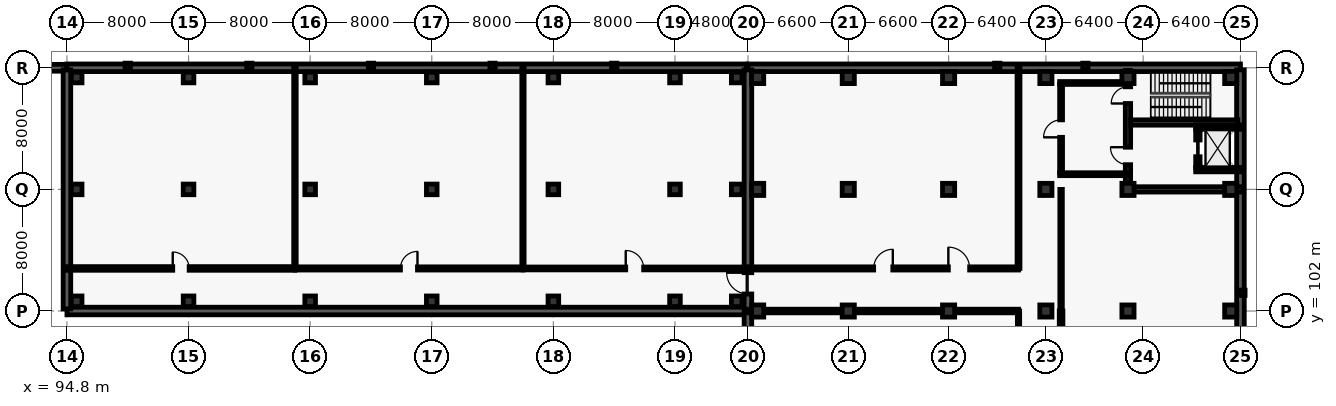
"""IFC4 building model, lengths in metres.
Left out: names, types, materials, properties, quantities, classifications, styles, units other than length and angle.
Written with IfcOpenShell. Run it as: python <this file> out.ifc"""

import sys

from ifc_helpers import new_model, si_unit, direction, frame, frame_2d, origin, origin_2d, place, context, subcontext, project, spatial, rectangle, extrude, element, fill, save


model = new_model("IFC4")
c1 = context("Model", 3, precision=1e-05, world=origin(), true_north=direction((0.0, 1.0)))
c2 = subcontext(c1, "Body", "Model", "MODEL_VIEW")
j1 = project(units=[si_unit("LENGTHUNIT", "METRE"), si_unit("PLANEANGLEUNIT", "RADIAN")], contexts=[c1])
p1 = place(None, origin())
s1 = spatial("IfcSite", under=j1, at=p1, CompositionType="ELEMENT")
p2 = place(p1, origin())
s2 = spatial("IfcBuilding", under=s1, at=p2, CompositionType="ELEMENT")
p3 = place(p2, frame((0.0, 0.0, -4.8)))
s3 = spatial("IfcBuildingStorey", under=s2, at=p3, CompositionType="ELEMENT", Elevation=-4.8)
for number, where, z_axis, x_axis in (
    (1, (95.44, 102.64, 0.0), (0.0, 0.0, 1.0), (1.0, 0.0, 0.0)),
    (2, (95.44, 110.0, 0.0), (0.0, 0.0, 1.0), (1.0, 0.0, 0.0)),
    (3, (95.44, 117.36, 0.0), (0.0, 0.0, 1.0), (1.0, 0.0, 0.0)),
    (4, (102.8, 102.64, 0.0), (0.0, 0.0, 1.0), (1.0, 0.0, 0.0)),
    (5, (102.8, 110.0, 0.0), (0.0, 0.0, 1.0), (1.0, 0.0, 0.0)),
    (6, (102.8, 117.36, 0.0), (0.0, 0.0, 1.0), (1.0, 0.0, 0.0)),
    (7, (110.8, 102.64, 0.0), (0.0, 0.0, 1.0), (1.0, 0.0, 0.0)),
    (8, (110.8, 110.0, 0.0), (0.0, 0.0, 1.0), (1.0, 0.0, 0.0)),
    (9, (110.8, 117.36, 0.0), (0.0, 0.0, 1.0), (1.0, 0.0, 0.0)),
    (10, (118.8, 102.64, 0.0), (0.0, 0.0, 1.0), (1.0, 0.0, 0.0)),
    (11, (118.8, 110.0, 0.0), (0.0, 0.0, 1.0), (1.0, 0.0, 0.0)),
    (12, (118.8, 117.36, 0.0), (0.0, 0.0, 1.0), (1.0, 0.0, 0.0)),
    (13, (126.8, 102.64, 0.0), (0.0, 0.0, 1.0), (1.0, 0.0, 0.0)),
    (14, (126.8, 110.0, 0.0), (0.0, 0.0, 1.0), (1.0, 0.0, 0.0)),
    (15, (126.8, 117.36, 0.0), (0.0, 0.0, 1.0), (1.0, 0.0, 0.0)),
    (16, (134.8, 102.64, 0.0), (0.0, 0.0, 1.0), (1.0, 0.0, 0.0)),
    (17, (134.8, 110.0, 0.0), (0.0, 0.0, 1.0), (1.0, 0.0, 0.0)),
    (18, (134.8, 117.36, 0.0), (0.0, 0.0, 1.0), (1.0, 0.0, 0.0)),
    (19, (138.86, 102.64, 0.0), (0.0, 0.0, 1.0), (1.0, 0.0, 0.0)),
    (20, (138.86, 110.0, 0.0), (0.0, 0.0, 1.0), (1.0, 0.0, 0.0)),
    (21, (138.86, 117.36, 0.0), (0.0, 0.0, 1.0), (1.0, 0.0, 0.0)),
):
    element("IfcColumn", number, at=place(p3, frame(where, z_axis=z_axis, x_axis=x_axis)), inside=s3, PredefinedType="COLUMN", context=c2, shape_type="SweptSolid", body=[
        extrude(rectangle(XDim=0.7, YDim=0.7, at=origin_2d()), origin(), (0.0, 0.0, 1.0), 4.8),
    ])
for number, where, z_axis, x_axis in (
    (22, (140.24, 102.0, 0.0), (0.0, 0.0, 1.0), (1.0, 0.0, 0.0)),
    (23, (140.24, 110.0, 0.0), (0.0, 0.0, 1.0), (1.0, 0.0, 0.0)),
    (24, (140.24, 117.36, 0.0), (0.0, 0.0, 1.0), (1.0, 0.0, 0.0)),
    (25, (146.2, 102.0, 0.0), (0.0, 0.0, 1.0), (1.0, 0.0, 0.0)),
    (26, (146.2, 110.0, 0.0), (0.0, 0.0, 1.0), (1.0, 0.0, 0.0)),
    (27, (146.2, 117.36, 0.0), (0.0, 0.0, 1.0), (1.0, 0.0, 0.0)),
    (28, (152.8, 102.0, 0.0), (0.0, 0.0, 1.0), (1.0, 0.0, 0.0)),
    (29, (152.8, 110.0, 0.0), (0.0, 0.0, 1.0), (1.0, 0.0, 0.0)),
    (30, (152.8, 117.36, 0.0), (0.0, 0.0, 1.0), (1.0, 0.0, 0.0)),
    (31, (159.2, 102.0, 0.0), (0.0, 0.0, 1.0), (1.0, 0.0, 0.0)),
    (32, (159.2, 110.0, 0.0), (0.0, 0.0, 1.0), (1.0, 0.0, 0.0)),
    (33, (159.2, 117.36, 0.0), (0.0, 0.0, 1.0), (1.0, 0.0, 0.0)),
    (34, (164.6, 102.0, 0.0), (0.0, 0.0, 1.0), (1.0, 0.0, 0.0)),
    (35, (164.6, 110.0, 0.0), (0.0, 0.0, 1.0), (1.0, 0.0, 0.0)),
    (36, (164.6, 117.36, 0.0), (0.0, 0.0, 1.0), (1.0, 0.0, 0.0)),
    (37, (171.36, 102.0, 0.0), (0.0, 0.0, 1.0), (1.0, 0.0, 0.0)),
    (38, (171.36, 110.0, 0.0), (0.0, 0.0, 1.0), (1.0, 0.0, 0.0)),
    (39, (171.36, 117.36, 0.0), (0.0, 0.0, 1.0), (1.0, 0.0, 0.0)),
):
    element("IfcColumn", number, at=place(p3, frame(where, z_axis=z_axis, x_axis=x_axis)), inside=s3, PredefinedType="COLUMN", context=c2, shape_type="SweptSolid", body=[
        extrude(rectangle(XDim=0.8, YDim=0.8, at=origin_2d()), origin(), (0.0, 0.0, 1.0), 4.8),
    ])
for number, where, z_axis, x_axis in (
    (40, (98.8, 118.08, -0.5), (0.0, 0.0, 1.0), (0.0, 1.0, 0.0)),
    (41, (106.8, 118.08, -0.5), (0.0, 0.0, 1.0), (0.0, 1.0, 0.0)),
    (42, (114.8, 118.08, -0.5), (0.0, 0.0, 1.0), (0.0, 1.0, 0.0)),
    (43, (122.8, 118.08, -0.5), (0.0, 0.0, 1.0), (0.0, 1.0, 0.0)),
    (44, (130.8, 118.08, -0.5), (0.0, 0.0, 1.0), (0.0, 1.0, 0.0)),
):
    element("IfcColumn", number, at=place(p3, frame(where, z_axis=z_axis, x_axis=x_axis)), inside=s3, PredefinedType="PILASTER", context=c2, shape_type="SweptSolid", body=[
        extrude(rectangle(XDim=0.35, YDim=0.45, at=origin_2d()), origin(), (0.0, 0.0, 1.0), 5.3),
    ])
for number, where, z_axis, x_axis in (
    (45, (172.08, 103.2, -0.48), (0.0, 0.0, 1.0), (1.0, 0.0, 0.0)),
    (46, (156.0, 118.08, -0.48), (0.0, 0.0, 1.0), (0.0, 1.0, 0.0)),
    (47, (161.8, 118.08, -0.48), (0.0, 0.0, 1.0), (0.0, 1.0, 0.0)),
):
    element("IfcColumn", number, at=place(p3, frame(where, z_axis=z_axis, x_axis=x_axis)), inside=s3, PredefinedType="PILASTER", context=c2, shape_type="SweptSolid", body=[
        extrude(rectangle(XDim=0.35, YDim=0.45, at=origin_2d()), origin(), (0.0, 0.0, 1.0), 5.28),
    ])
p4 = place(p3, frame((46.02, 118.0, 0.0), z_axis=(0.0, 0.0, 1.0), x_axis=(1.0, 0.0, 0.0)))
e48 = element("IfcWall", 48, at=p4, inside=s3, PredefinedType="USERDEFINED", context=c2, shape_type="SweptSolid", body=[
    extrude(rectangle(XDim=48.76, YDim=0.45, at=frame_2d((24.38, 0.0))), origin(), (0.0, 0.0, 1.0), 4.53),
])
for number, where, z_axis, x_axis in (
    (49, (94.8, 118.0, 0.0), (0.0, 0.0, 1.0), (1.0, 0.0, 0.0)),
    (50, (139.5, 102.0, 0.0), (0.0, 0.0, 1.0), (-1.0, 0.0, 0.0)),
):
    element("IfcWall", number, at=place(p3, frame(where, z_axis=z_axis, x_axis=x_axis)), inside=s3, PredefinedType="USERDEFINED", context=c2, shape_type="SweptSolid", body=[
        extrude(rectangle(XDim=44.7, YDim=0.5, at=frame_2d((22.35, 0.0))), origin(), (0.0, 0.0, 1.0), 4.45),
    ])
p5 = place(p3, frame((94.8, 102.14, 0.0), z_axis=(0.0, 0.0, 1.0), x_axis=(0.0, 1.0, 0.0)))
e51 = element("IfcWall", 51, at=p5, inside=s3, PredefinedType="USERDEFINED", context=c2, shape_type="SweptSolid", body=[
    extrude(rectangle(XDim=15.72, YDim=0.5, at=frame_2d((7.86, 0.0))), origin(), (0.0, 0.0, 1.0), 4.45),
])
p6 = place(p3, frame((139.6, 118.0, 0.0), z_axis=(0.0, 0.0, 1.0), x_axis=(1.0, 0.0, 0.0)))
e52 = element("IfcWall", 52, at=p6, inside=s3, PredefinedType="USERDEFINED", context=c2, shape_type="SweptSolid", body=[
    extrude(rectangle(XDim=32.4, YDim=0.5, at=frame_2d((16.2, 0.0))), origin(), (0.0, 0.0, 1.0), 4.5),
])
p7 = place(p3, frame((172.0, 117.86, 0.0), z_axis=(0.0, 0.0, 1.0), x_axis=(0.0, -1.0, 0.0)))
e53 = element("IfcWall", 53, at=p7, inside=s3, PredefinedType="USERDEFINED", context=c2, shape_type="SweptSolid", body=[
    extrude(rectangle(XDim=46.12, YDim=0.5, at=frame_2d((23.06, 0.0))), origin(), (0.0, 0.0, 1.0), 4.5),
])
p8 = place(p3, frame((139.6, 71.74, 0.0), z_axis=(0.0, 0.0, 1.0), x_axis=(0.0, 1.0, 0.0)))
e54 = element("IfcWall", 54, at=p8, inside=s3, PredefinedType="USERDEFINED", context=c2, shape_type="SweptSolid", body=[
    extrude(rectangle(XDim=46.12, YDim=0.5, at=frame_2d((23.06, 0.0))), origin(), (0.0, 0.0, 1.0), 3.67),
])
p9 = place(p8, frame((31.38, 0.0, 0.0)))
e55 = element("IfcOpeningElement", 55, at=p9, cuts=e54, PredefinedType="OPENING", context=c2, shape_type="SweptSolid", body=[
    extrude(rectangle(XDim=1.4, YDim=2.25, at=frame_2d((0.7, 1.125))), frame((0.0, 0.26, 0.0), z_axis=(0.0, -1.0, 0.0), x_axis=(1.0, 0.0, 0.0)), (0.0, 0.0, 1.0), 0.52),
])
p10 = place(p3, frame((165.002, 110.0, 0.0), z_axis=(0.0, 0.0, 1.0), x_axis=(1.0, 0.0, 0.0)))
e56 = element("IfcWall", 56, at=p10, inside=s3, PredefinedType="SHEAR", context=c2, shape_type="SweptSolid", body=[
    extrude(rectangle(XDim=7.173, YDim=0.35, at=frame_2d((3.586, 0.0))), origin(), (0.0, 0.0, 1.0), 4.5),
])
p11 = place(p3, frame((164.6, 110.402, 0.0), z_axis=(0.0, 0.0, 1.0), x_axis=(0.0, 1.0, 0.0)))
e57 = element("IfcWall", 57, at=p11, inside=s3, PredefinedType="SHEAR", context=c2, shape_type="SweptSolid", body=[
    extrude(rectangle(XDim=7.423, YDim=0.35, at=frame_2d((3.711, 0.0))), origin(), (0.0, 0.0, 1.0), 4.5),
])
p12 = place(p11, frame((5.248, 0.0, 0.0)))
e58 = element("IfcOpeningElement", 58, at=p12, cuts=e57, PredefinedType="OPENING", context=c2, shape_type="SweptSolid", body=[
    extrude(rectangle(XDim=1.1, YDim=2.15, at=frame_2d((0.55, 1.075))), frame((0.0, 0.185, 0.0), z_axis=(0.0, -1.0, 0.0), x_axis=(1.0, 0.0, 0.0)), (0.0, 0.0, 1.0), 0.37),
])
p13 = place(p11, frame((1.223, 0.0, 0.0)))
e59 = element("IfcOpeningElement", 59, at=p13, cuts=e57, PredefinedType="OPENING", context=c2, shape_type="SweptSolid", body=[
    extrude(rectangle(XDim=1.15, YDim=2.2, at=frame_2d((0.575, 1.1))), frame((0.0, 0.185, 0.0), z_axis=(0.0, -1.0, 0.0), x_axis=(1.0, 0.0, 0.0)), (0.0, 0.0, 1.0), 0.37),
])
p14 = place(p3, frame((164.775, 114.4, 0.0), z_axis=(0.0, 0.0, 1.0), x_axis=(1.0, 0.0, 0.0)))
e60 = element("IfcWall", 60, at=p14, inside=s3, PredefinedType="SHEAR", context=c2, shape_type="SweptSolid", body=[
    extrude(rectangle(XDim=7.05, YDim=0.35, at=frame_2d((3.525, 0.0))), origin(), (0.0, 0.0, 1.0), 4.5),
])
for number, where, z_axis, x_axis in (
    (61, (169.055, 111.3, 0.0), (0.0, 0.0, 1.0), (1.0, 0.0, 0.0)),
    (62, (169.055, 114.1, 0.0), (0.0, 0.0, 1.0), (1.0, 0.0, 0.0)),
):
    element("IfcWall", number, at=place(p3, frame(where, z_axis=z_axis, x_axis=x_axis)), inside=s3, PredefinedType="SHEAR", context=c2, shape_type="SweptSolid", body=[
        extrude(rectangle(XDim=2.89, YDim=0.29, at=frame_2d((1.445, 0.0))), origin(), (0.0, 0.0, 1.0), 4.5),
    ])
p15 = place(p3, frame((169.2, 111.445, 0.0), z_axis=(0.0, 0.0, 1.0), x_axis=(0.0, 1.0, 0.0)))
e63 = element("IfcWall", 63, at=p15, inside=s3, PredefinedType="SHEAR", context=c2, shape_type="SweptSolid", body=[
    extrude(rectangle(XDim=2.51, YDim=0.29, at=frame_2d((1.255, 0.0))), origin(), (0.0, 0.0, 1.0), 4.5),
])
p16 = place(p15, frame((0.705, 0.0, 0.0)))
e64 = element("IfcOpeningElement", 64, at=p16, cuts=e63, PredefinedType="OPENING", context=c2, shape_type="SweptSolid", body=[
    extrude(rectangle(XDim=1.1, YDim=2.15, at=frame_2d((0.55, 1.075))), frame((0.0, 0.155, 0.0), z_axis=(0.0, -1.0, 0.0), x_axis=(1.0, 0.0, 0.0)), (0.0, 0.0, 1.0), 0.31),
])
p17 = place(p3, frame((160.105, 111.0, 0.0), z_axis=(0.0, 0.0, 1.0), x_axis=(1.0, 0.0, 0.0)))
e65 = element("IfcWall", 65, at=p17, inside=s3, PredefinedType="PARTITIONING", context=c2, shape_type="SweptSolid", body=[
    extrude(rectangle(XDim=4.495, YDim=0.19, at=frame_2d((2.248, 0.0))), origin(), (0.0, 0.0, 1.0), 4.5),
])
p18 = place(p3, frame((160.105, 117.0, 0.0), z_axis=(0.0, 0.0, 1.0), x_axis=(1.0, 0.0, 0.0)))
e66 = element("IfcWall", 66, at=p18, inside=s3, PredefinedType="PARTITIONING", context=c2, shape_type="SweptSolid", body=[
    extrude(rectangle(XDim=4.093, YDim=0.19, at=frame_2d((2.046, 0.0))), origin(), (0.0, 0.0, 1.0), 3.85),
])
p19 = place(p3, frame((160.2, 111.095, 0.0), z_axis=(0.0, 0.0, 1.0), x_axis=(0.0, 1.0, 0.0)))
e67 = element("IfcWall", 67, at=p19, inside=s3, PredefinedType="PARTITIONING", context=c2, shape_type="SweptSolid", body=[
    extrude(rectangle(XDim=5.81, YDim=0.19, at=frame_2d((2.905, 0.0))), origin(), (0.0, 0.0, 1.0), 4.5),
])
p20 = place(p19, frame((2.33, 0.0, 0.0)))
e68 = element("IfcOpeningElement", 68, at=p20, cuts=e67, PredefinedType="OPENING", context=c2, shape_type="SweptSolid", body=[
    extrude(rectangle(XDim=1.15, YDim=2.2, at=frame_2d((0.575, 1.1))), frame((0.0, 0.105, 0.0), z_axis=(0.0, -1.0, 0.0), x_axis=(1.0, 0.0, 0.0)), (0.0, 0.0, 1.0), 0.21),
])
p21 = place(p3, frame((94.8, 104.8, 0.0), z_axis=(0.0, 0.0, 1.0), x_axis=(1.0, 0.0, 0.0)))
e69 = element("IfcWall", 69, at=p21, inside=s3, PredefinedType="PARTITIONING", context=c2, shape_type="SweptSolid", body=[
    extrude(rectangle(XDim=15.0, YDim=0.24, at=frame_2d((7.5, 0.0))), origin(), (0.0, 0.0, 1.0), 4.45),
])
p22 = place(p21, frame((6.96, 0.0, 0.0)))
e70 = element("IfcOpeningElement", 70, at=p22, cuts=e69, PredefinedType="OPENING", context=c2, shape_type="SweptSolid", body=[
    extrude(rectangle(XDim=1.08, YDim=2.15, at=frame_2d((0.54, 1.075))), frame((0.0, 0.13, 0.0), z_axis=(0.0, -1.0, 0.0), x_axis=(1.0, 0.0, 0.0)), (0.0, 0.0, 1.0), 0.26),
])
p23 = place(p3, frame((109.8, 104.8, 0.0), z_axis=(0.0, 0.0, 1.0), x_axis=(1.0, 0.0, 0.0)))
e71 = element("IfcWall", 71, at=p23, inside=s3, PredefinedType="PARTITIONING", context=c2, shape_type="SweptSolid", body=[
    extrude(rectangle(XDim=15.0, YDim=0.21, at=frame_2d((7.5, 0.0))), origin(), (0.0, 0.0, 1.0), 4.45),
])
p24 = place(p23, frame((6.94, 0.0, 0.0)))
e72 = element("IfcOpeningElement", 72, at=p24, cuts=e71, PredefinedType="OPENING", context=c2, shape_type="SweptSolid", body=[
    extrude(rectangle(XDim=1.12, YDim=2.15, at=frame_2d((0.56, 1.075))), frame((0.0, 0.115, 0.0), z_axis=(0.0, -1.0, 0.0), x_axis=(1.0, 0.0, 0.0)), (0.0, 0.0, 1.0), 0.23),
])
p25 = place(p3, frame((124.8, 104.8, 0.0), z_axis=(0.0, 0.0, 1.0), x_axis=(1.0, 0.0, 0.0)))
e73 = element("IfcWall", 73, at=p25, inside=s3, PredefinedType="PARTITIONING", context=c2, shape_type="SweptSolid", body=[
    extrude(rectangle(XDim=14.7, YDim=0.19, at=frame_2d((7.35, 0.0))), origin(), (0.0, 0.0, 1.0), 4.45),
])
p26 = place(p25, frame((6.76, 0.0, 0.0)))
e74 = element("IfcOpeningElement", 74, at=p26, cuts=e73, PredefinedType="OPENING", context=c2, shape_type="SweptSolid", body=[
    extrude(rectangle(XDim=1.18, YDim=2.15, at=frame_2d((0.59, 1.075))), frame((0.0, 0.105, 0.0), z_axis=(0.0, -1.0, 0.0), x_axis=(1.0, 0.0, 0.0)), (0.0, 0.0, 1.0), 0.21),
])
p27 = place(p3, frame((109.8, 118.0, 0.0), z_axis=(0.0, 0.0, 1.0), x_axis=(0.0, -1.0, 0.0)))
e75 = element("IfcWall", 75, at=p27, inside=s3, PredefinedType="PARTITIONING", context=c2, shape_type="SweptSolid", body=[
    extrude(rectangle(XDim=13.2, YDim=0.165, at=frame_2d((6.6, 0.0))), origin(), (0.0, 0.0, 1.0), 4.45),
])
p28 = place(p3, frame((124.8, 118.0, 0.0), z_axis=(0.0, 0.0, 1.0), x_axis=(0.0, -1.0, 0.0)))
e76 = element("IfcWall", 76, at=p28, inside=s3, PredefinedType="PARTITIONING", context=c2, shape_type="SweptSolid", body=[
    extrude(rectangle(XDim=13.2, YDim=0.15, at=frame_2d((6.6, 0.0))), origin(), (0.0, 0.0, 1.0), 4.45),
])
p29 = place(p3, frame((157.4, 102.0, 0.0), z_axis=(0.0, 0.0, 1.0), x_axis=(-1.0, 0.0, 0.0)))
e77 = element("IfcWall", 77, at=p29, inside=s3, PredefinedType="PARTITIONING", context=c2, shape_type="SweptSolid", body=[
    extrude(rectangle(XDim=17.8, YDim=0.24, at=frame_2d((8.9, 0.0))), origin(), (0.0, 0.0, 1.0), 3.85),
])
p30 = place(p3, frame((139.6, 104.8, 0.0), z_axis=(0.0, 0.0, 1.0), x_axis=(1.0, 0.0, 0.0)))
e78 = element("IfcWall", 78, at=p30, inside=s3, PredefinedType="PARTITIONING", context=c2, shape_type="SweptSolid", body=[
    extrude(rectangle(XDim=17.8, YDim=0.21, at=frame_2d((8.9, 0.0))), origin(), (0.0, 0.0, 1.0), 4.5),
])
p31 = place(p30, frame((8.27, 0.0, 0.0)))
e79 = element("IfcOpeningElement", 79, at=p31, cuts=e78, PredefinedType="OPENING", context=c2, shape_type="SweptSolid", body=[
    extrude(rectangle(XDim=1.26, YDim=2.2, at=frame_2d((0.63, 1.1))), frame((0.0, 0.115, 0.0), z_axis=(0.0, -1.0, 0.0), x_axis=(1.0, 0.0, 0.0)), (0.0, 0.0, 1.0), 0.23),
])
p32 = place(p30, frame((13.184, 0.0, 0.0)))
e80 = element("IfcOpeningElement", 80, at=p32, cuts=e78, PredefinedType="OPENING", context=c2, shape_type="SweptSolid", body=[
    extrude(rectangle(XDim=1.4, YDim=2.25, at=frame_2d((0.7, 1.125))), frame((0.0, 0.115, 0.0), z_axis=(0.0, -1.0, 0.0), x_axis=(1.0, 0.0, 0.0)), (0.0, 0.0, 1.0), 0.23),
])
p33 = place(p3, frame((157.4, 104.8, 0.0), z_axis=(0.0, 0.0, 1.0), x_axis=(0.0, 1.0, 0.0)))
e81 = element("IfcWall", 81, at=p33, inside=s3, PredefinedType="PARTITIONING", context=c2, shape_type="SweptSolid", body=[
    extrude(rectangle(XDim=13.2, YDim=0.19, at=frame_2d((6.6, 0.0))), origin(), (0.0, 0.0, 1.0), 4.5),
])
p34 = place(p3, frame((160.2, 110.0, 0.0), z_axis=(0.0, 0.0, 1.0), x_axis=(0.0, -1.0, 0.0)))
e82 = element("IfcWall", 82, at=p34, inside=s3, PredefinedType="PARTITIONING", context=c2, shape_type="SweptSolid", body=[
    extrude(rectangle(XDim=8.0, YDim=0.165, at=frame_2d((4.0, 0.0))), origin(), (0.0, 0.0, 1.0), 4.5),
])
p35 = place(p3, frame((157.4, 71.6, 0.0), z_axis=(0.0, 0.0, 1.0), x_axis=(0.0, 1.0, 0.0)))
e83 = element("IfcWall", 83, at=p35, inside=s3, PredefinedType="PARTITIONING", context=c2, shape_type="SweptSolid", body=[
    extrude(rectangle(XDim=30.4, YDim=0.15, at=frame_2d((15.2, 0.0))), origin(), (0.0, 0.0, 1.0), 4.5),
])
p36 = place(p35, frame((14.18, 0.0, 0.0)))
e84 = element("IfcOpeningElement", 84, at=p36, cuts=e83, PredefinedType="OPENING", context=c2, shape_type="SweptSolid", body=[
    extrude(rectangle(XDim=1.22, YDim=2.2, at=frame_2d((0.61, 1.1))), frame((0.0, 0.085, 0.0), z_axis=(0.0, -1.0, 0.0), x_axis=(1.0, 0.0, 0.0)), (0.0, 0.0, 1.0), 0.17),
])
p37 = place(p35, frame((23.102, 0.0, 0.0)))
e85 = element("IfcOpeningElement", 85, at=p37, cuts=e83, PredefinedType="OPENING", context=c2, shape_type="SweptSolid", body=[
    extrude(rectangle(XDim=1.22, YDim=2.2, at=frame_2d((0.61, 1.1))), frame((0.0, 0.085, 0.0), z_axis=(0.0, -1.0, 0.0), x_axis=(1.0, 0.0, 0.0)), (0.0, 0.0, 1.0), 0.17),
])
p38 = place(p3, frame((160.2, 102.0, 0.0), z_axis=(0.0, 0.0, 1.0), x_axis=(0.0, -1.0, 0.0)))
e86 = element("IfcWall", 86, at=p38, inside=s3, PredefinedType="PARTITIONING", context=c2, shape_type="SweptSolid", body=[
    extrude(rectangle(XDim=22.4, YDim=0.24, at=frame_2d((11.2, 0.0))), origin(), (0.0, 0.0, 1.0), 4.5),
])
p39 = place(p38, frame((10.55, 0.0, 0.0)))
e87 = element("IfcOpeningElement", 87, at=p39, cuts=e86, PredefinedType="OPENING", context=c2, shape_type="SweptSolid", body=[
    extrude(rectangle(XDim=1.3, YDim=2.2, at=frame_2d((0.65, 1.1))), frame((0.0, 0.13, 0.0), z_axis=(0.0, -1.0, 0.0), x_axis=(1.0, 0.0, 0.0)), (0.0, 0.0, 1.0), 0.26),
])
p40 = place(p38, frame((16.772, 0.0, 0.0)))
e88 = element("IfcOpeningElement", 88, at=p40, cuts=e86, PredefinedType="OPENING", context=c2, shape_type="SweptSolid", body=[
    extrude(rectangle(XDim=1.4, YDim=2.25, at=frame_2d((0.7, 1.125))), frame((0.0, 0.13, 0.0), z_axis=(0.0, -1.0, 0.0), x_axis=(1.0, 0.0, 0.0)), (0.0, 0.0, 1.0), 0.26),
])
p41 = place(p12, origin())
e89 = element("IfcDoor", 89, at=p41, inside=s3, OperationType="SINGLE_SWING_LEFT", PredefinedType="DOOR", context=c2, shape_type="SweptSolid", body=[
    extrude(rectangle(XDim=1.1, YDim=2.15, at=frame_2d((0.55, 1.075))), frame((0.0, 0.025, 0.0), z_axis=(0.0, -1.0, 0.0), x_axis=(1.0, 0.0, 0.0)), (0.0, 0.0, 1.0), 0.05),
])
fill(e58, e89)
p42 = place(p13, origin())
e90 = element("IfcDoor", 90, at=p42, inside=s3, OperationType="SINGLE_SWING_RIGHT", PredefinedType="DOOR", context=c2, shape_type="SweptSolid", body=[
    extrude(rectangle(XDim=1.15, YDim=2.2, at=frame_2d((0.575, 1.1))), frame((0.0, 0.025, 0.0), z_axis=(0.0, -1.0, 0.0), x_axis=(1.0, 0.0, 0.0)), (0.0, 0.0, 1.0), 0.05),
])
fill(e59, e90)
p43 = place(p16, origin())
e91 = element("IfcDoor", 91, at=p43, inside=s3, OperationType="SLIDING_TO_LEFT", PredefinedType="DOOR", context=c2, shape_type="SweptSolid", body=[
    extrude(rectangle(XDim=1.1, YDim=2.15, at=frame_2d((0.55, 1.075))), frame((0.0, 0.025, 0.0), z_axis=(0.0, -1.0, 0.0), x_axis=(1.0, 0.0, 0.0)), (0.0, 0.0, 1.0), 0.05),
])
fill(e64, e91)
p44 = place(p20, origin())
e92 = element("IfcDoor", 92, at=p44, inside=s3, OperationType="SINGLE_SWING_LEFT", PredefinedType="DOOR", context=c2, shape_type="SweptSolid", body=[
    extrude(rectangle(XDim=1.15, YDim=2.2, at=frame_2d((0.575, 1.1))), frame((0.0, 0.025, 0.0), z_axis=(0.0, -1.0, 0.0), x_axis=(1.0, 0.0, 0.0)), (0.0, 0.0, 1.0), 0.05),
])
fill(e68, e92)
p45 = place(p9, origin())
e93 = element("IfcDoor", 93, at=p45, inside=s3, OperationType="SINGLE_SWING_RIGHT", PredefinedType="DOOR", context=c2, shape_type="SweptSolid", body=[
    extrude(rectangle(XDim=1.4, YDim=2.25, at=frame_2d((0.7, 1.125))), frame((0.0, 0.025, 0.0), z_axis=(0.0, -1.0, 0.0), x_axis=(1.0, 0.0, 0.0)), (0.0, 0.0, 1.0), 0.05),
])
fill(e55, e93)
p46 = place(p22, origin())
e94 = element("IfcDoor", 94, at=p46, inside=s3, OperationType="SINGLE_SWING_LEFT", PredefinedType="DOOR", context=c2, shape_type="SweptSolid", body=[
    extrude(rectangle(XDim=1.08, YDim=2.15, at=frame_2d((0.54, 1.075))), frame((0.0, 0.025, 0.0), z_axis=(0.0, -1.0, 0.0), x_axis=(1.0, 0.0, 0.0)), (0.0, 0.0, 1.0), 0.05),
])
fill(e70, e94)
p47 = place(p24, origin())
e95 = element("IfcDoor", 95, at=p47, inside=s3, OperationType="SINGLE_SWING_RIGHT", PredefinedType="DOOR", context=c2, shape_type="SweptSolid", body=[
    extrude(rectangle(XDim=1.12, YDim=2.15, at=frame_2d((0.56, 1.075))), frame((0.0, 0.025, 0.0), z_axis=(0.0, -1.0, 0.0), x_axis=(1.0, 0.0, 0.0)), (0.0, 0.0, 1.0), 0.05),
])
fill(e72, e95)
p48 = place(p26, origin())
e96 = element("IfcDoor", 96, at=p48, inside=s3, OperationType="SINGLE_SWING_LEFT", PredefinedType="DOOR", context=c2, shape_type="SweptSolid", body=[
    extrude(rectangle(XDim=1.18, YDim=2.15, at=frame_2d((0.59, 1.075))), frame((0.0, 0.025, 0.0), z_axis=(0.0, -1.0, 0.0), x_axis=(1.0, 0.0, 0.0)), (0.0, 0.0, 1.0), 0.05),
])
fill(e74, e96)
p49 = place(p31, origin())
e97 = element("IfcDoor", 97, at=p49, inside=s3, OperationType="SINGLE_SWING_RIGHT", PredefinedType="DOOR", context=c2, shape_type="SweptSolid", body=[
    extrude(rectangle(XDim=1.26, YDim=2.2, at=frame_2d((0.63, 1.1))), frame((0.0, 0.025, 0.0), z_axis=(0.0, -1.0, 0.0), x_axis=(1.0, 0.0, 0.0)), (0.0, 0.0, 1.0), 0.05),
])
fill(e79, e97)
p50 = place(p32, origin())
e98 = element("IfcDoor", 98, at=p50, inside=s3, OperationType="SINGLE_SWING_LEFT", PredefinedType="DOOR", context=c2, shape_type="SweptSolid", body=[
    extrude(rectangle(XDim=1.4, YDim=2.25, at=frame_2d((0.7, 1.125))), frame((0.0, 0.025, 0.0), z_axis=(0.0, -1.0, 0.0), x_axis=(1.0, 0.0, 0.0)), (0.0, 0.0, 1.0), 0.05),
])
fill(e80, e98)
save(model, sys.argv[1])
